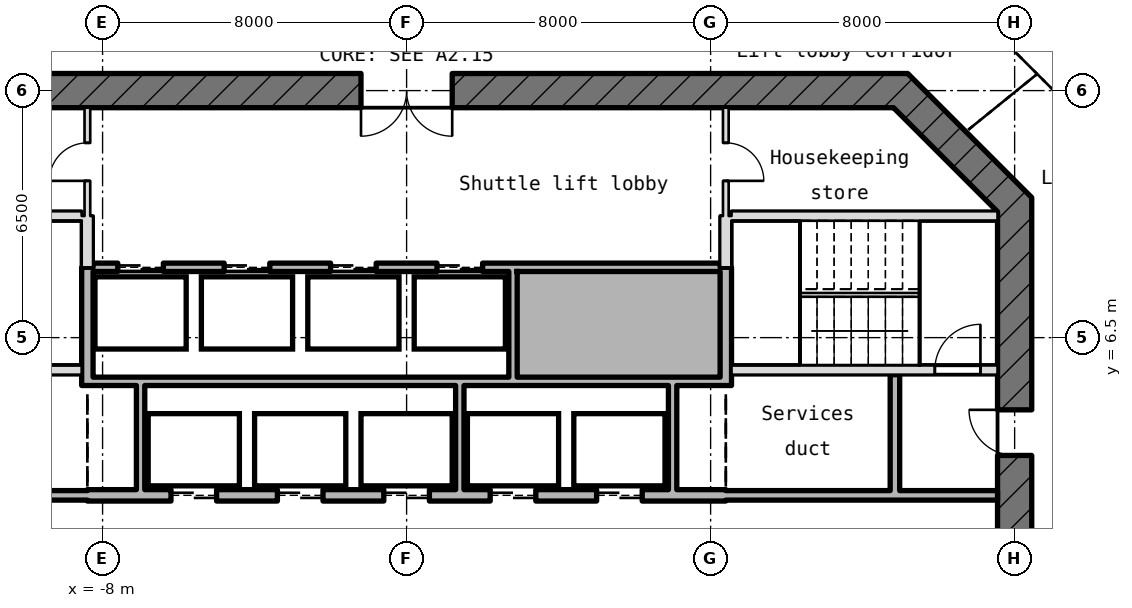
"""IFC4 building model, lengths in metres.
Left out: names, types, materials, properties, quantities, classifications, styles, units other than length and angle.
Written with IfcOpenShell. Run it as: python <this file> out.ifc"""

import sys

from ifc_helpers import new_model, si_unit, direction, frame, frame_2d, origin, place, context, subcontext, project, spatial, rectangle, extrude, element, fill, save


model = new_model("IFC4")
c1 = context("Model", 3, precision=1e-05, world=origin(), true_north=direction((0.0, 1.0)))
c2 = subcontext(c1, "Body", "Model", "MODEL_VIEW")
j1 = project(units=[si_unit("LENGTHUNIT", "METRE"), si_unit("PLANEANGLEUNIT", "RADIAN")], contexts=[c1])
p1 = place(None, origin())
s1 = spatial("IfcSite", under=j1, at=p1, CompositionType="ELEMENT")
p2 = place(p1, origin())
s2 = spatial("IfcBuilding", under=s1, at=p2, CompositionType="ELEMENT")
p3 = place(p2, frame((0.0, 0.0, 155.65)))
s3 = spatial("IfcBuildingStorey", under=s2, at=p3, CompositionType="ELEMENT", Elevation=155.65)
p4 = place(p3, frame((16.0, -10.186, -0.25), z_axis=(0.0, 0.0, 1.0), x_axis=(0.0, 1.0, 0.0)))
e1 = element("IfcWall", 1, at=p4, inside=s3, PredefinedType="SHEAR", context=c2, shape_type="SweptSolid", body=[
    extrude(rectangle(XDim=20.373, YDim=0.9, at=frame_2d((10.186, 0.0))), origin(), (0.0, 0.0, 1.0), 5.47),
])
p5 = place(p4, frame((8.986, 0.0, 0.25)))
e2 = element("IfcOpeningElement", 2, at=p5, cuts=e1, PredefinedType="OPENING", context=c2, shape_type="SweptSolid", body=[
    extrude(rectangle(XDim=2.4, YDim=2.1, at=frame_2d((1.2, 1.05))), frame((0.0, 0.46, 0.0), z_axis=(0.0, -1.0, 0.0), x_axis=(1.0, 0.0, 0.0)), (0.0, 0.0, 1.0), 0.92),
])
p6 = place(p4, frame((13.586, 0.0, 0.25)))
e3 = element("IfcOpeningElement", 3, at=p6, cuts=e1, PredefinedType="OPENING", context=c2, shape_type="SweptSolid", body=[
    extrude(rectangle(XDim=1.2, YDim=2.1, at=frame_2d((0.6, 1.05))), frame((0.0, 0.46, 0.0), z_axis=(0.0, -1.0, 0.0), x_axis=(1.0, 0.0, 0.0)), (0.0, 0.0, 1.0), 0.92),
])
p7 = place(p3, frame((16.132, 9.868, -0.25), z_axis=(0.0, 0.0, 1.0), x_axis=(-0.707106781187, 0.707106781187, 0.0)))
e4 = element("IfcWall", 4, at=p7, inside=s3, PredefinedType="SHEAR", context=c2, shape_type="SweptSolid", body=[
    extrude(rectangle(XDim=4.615, YDim=0.9, at=frame_2d((2.308, 0.0))), origin(), (0.0, 0.0, 1.0), 5.47),
])
p8 = place(p3, frame((13.186, 13.0, -0.25), z_axis=(0.0, 0.0, 1.0), x_axis=(-1.0, 0.0, 0.0)))
e5 = element("IfcWall", 5, at=p8, inside=s3, PredefinedType="SHEAR", context=c2, shape_type="SweptSolid", body=[
    extrude(rectangle(XDim=26.373, YDim=0.9, at=frame_2d((13.186, 0.0))), origin(), (0.0, 0.0, 1.0), 5.47),
])
p9 = place(p8, frame((11.986, 0.0, 0.25)))
e6 = element("IfcOpeningElement", 6, at=p9, cuts=e5, PredefinedType="OPENING", context=c2, shape_type="SweptSolid", body=[
    extrude(rectangle(XDim=2.4, YDim=2.1, at=frame_2d((1.2, 1.05))), frame((0.0, 0.46, 0.0), z_axis=(0.0, -1.0, 0.0), x_axis=(1.0, 0.0, 0.0)), (0.0, 0.0, 1.0), 0.92),
])
p10 = place(p3, frame((-15.55, 2.35, 0.0), z_axis=(0.0, 0.0, 1.0), x_axis=(1.0, 0.0, 0.0)))
e7 = element("IfcWall", 7, at=p10, inside=s3, PredefinedType="STANDARD", context=c2, shape_type="SweptSolid", body=[
    extrude(rectangle(XDim=7.15, YDim=0.25, at=frame_2d((3.575, 0.0))), origin(), (0.0, 0.0, 1.0), 5.22),
])
p11 = place(p3, frame((-8.4, 2.35, -0.25), z_axis=(0.0, 0.0, 1.0), x_axis=(1.0, 0.0, 0.0)))
e8 = element("IfcWall", 8, at=p11, inside=s3, PredefinedType="SHEAR", context=c2, shape_type="SweptSolid", body=[
    extrude(rectangle(XDim=16.8, YDim=0.3, at=frame_2d((8.4, 0.0))), origin(), (0.0, 0.0, 1.0), 5.47),
])
p12 = place(p11, frame((2.2, 0.0, 0.25)))
e9 = element("IfcOpeningElement", 9, at=p12, cuts=e8, PredefinedType="OPENING", context=c2, shape_type="SweptSolid", body=[
    extrude(rectangle(XDim=1.2, YDim=2.1, at=frame_2d((0.6, 1.05))), frame((0.0, 0.16, 0.0), z_axis=(0.0, -1.0, 0.0), x_axis=(1.0, 0.0, 0.0)), (0.0, 0.0, 1.0), 0.32),
])
p13 = place(p11, frame((5.0, 0.0, 0.25)))
e10 = element("IfcOpeningElement", 10, at=p13, cuts=e8, PredefinedType="OPENING", context=c2, shape_type="SweptSolid", body=[
    extrude(rectangle(XDim=1.2, YDim=2.1, at=frame_2d((0.6, 1.05))), frame((0.0, 0.16, 0.0), z_axis=(0.0, -1.0, 0.0), x_axis=(1.0, 0.0, 0.0)), (0.0, 0.0, 1.0), 0.32),
])
p14 = place(p11, frame((7.8, 0.0, 0.25)))
e11 = element("IfcOpeningElement", 11, at=p14, cuts=e8, PredefinedType="OPENING", context=c2, shape_type="SweptSolid", body=[
    extrude(rectangle(XDim=1.2, YDim=2.1, at=frame_2d((0.6, 1.05))), frame((0.0, 0.16, 0.0), z_axis=(0.0, -1.0, 0.0), x_axis=(1.0, 0.0, 0.0)), (0.0, 0.0, 1.0), 0.32),
])
p15 = place(p11, frame((10.6, 0.0, 0.25)))
e12 = element("IfcOpeningElement", 12, at=p15, cuts=e8, PredefinedType="OPENING", context=c2, shape_type="SweptSolid", body=[
    extrude(rectangle(XDim=1.2, YDim=2.1, at=frame_2d((0.6, 1.05))), frame((0.0, 0.16, 0.0), z_axis=(0.0, -1.0, 0.0), x_axis=(1.0, 0.0, 0.0)), (0.0, 0.0, 1.0), 0.32),
])
p16 = place(p11, frame((13.4, 0.0, 0.25)))
e13 = element("IfcOpeningElement", 13, at=p16, cuts=e8, PredefinedType="OPENING", context=c2, shape_type="SweptSolid", body=[
    extrude(rectangle(XDim=1.2, YDim=2.1, at=frame_2d((0.6, 1.05))), frame((0.0, 0.16, 0.0), z_axis=(0.0, -1.0, 0.0), x_axis=(1.0, 0.0, 0.0)), (0.0, 0.0, 1.0), 0.32),
])
p17 = place(p3, frame((8.4, 2.35, 0.0), z_axis=(0.0, 0.0, 1.0), x_axis=(1.0, 0.0, 0.0)))
e14 = element("IfcWall", 14, at=p17, inside=s3, PredefinedType="STANDARD", context=c2, shape_type="SweptSolid", body=[
    extrude(rectangle(XDim=7.15, YDim=0.25, at=frame_2d((3.575, 0.0))), origin(), (0.0, 0.0, 1.0), 5.22),
])
p18 = place(p3, frame((-8.25, 5.35, 0.0), z_axis=(0.0, 0.0, 1.0), x_axis=(1.0, 0.0, 0.0)))
e15 = element("IfcWall", 15, at=p18, inside=s3, PredefinedType="STANDARD", context=c2, shape_type="SweptSolid", body=[
    extrude(rectangle(XDim=16.5, YDim=0.22, at=frame_2d((8.25, 0.0))), origin(), (0.0, 0.0, 1.0), 5.22),
])
p19 = place(p3, frame((-15.55, 5.65, -0.25), z_axis=(0.0, 0.0, 1.0), x_axis=(1.0, 0.0, 0.0)))
e16 = element("IfcWall", 16, at=p19, inside=s3, PredefinedType="SHEAR", context=c2, shape_type="SweptSolid", body=[
    extrude(rectangle(XDim=7.0, YDim=0.25, at=frame_2d((3.5, 0.0))), origin(), (0.0, 0.0, 1.0), 5.47),
])
p20 = place(p19, frame((0.45, 0.0, 0.25)))
e17 = element("IfcOpeningElement", 17, at=p20, cuts=e16, PredefinedType="OPENING", context=c2, shape_type="SweptSolid", body=[
    extrude(rectangle(XDim=1.2, YDim=2.1, at=frame_2d((0.6, 1.05))), frame((0.0, 0.135, 0.0), z_axis=(0.0, -1.0, 0.0), x_axis=(1.0, 0.0, 0.0)), (0.0, 0.0, 1.0), 0.27),
])
p21 = place(p3, frame((8.55, 5.65, -0.25), z_axis=(0.0, 0.0, 1.0), x_axis=(1.0, 0.0, 0.0)))
e18 = element("IfcWall", 18, at=p21, inside=s3, PredefinedType="SHEAR", context=c2, shape_type="SweptSolid", body=[
    extrude(rectangle(XDim=7.0, YDim=0.25, at=frame_2d((3.5, 0.0))), origin(), (0.0, 0.0, 1.0), 5.47),
])
p22 = place(p21, frame((5.35, 0.0, 0.25)))
e19 = element("IfcOpeningElement", 19, at=p22, cuts=e18, PredefinedType="OPENING", context=c2, shape_type="SweptSolid", body=[
    extrude(rectangle(XDim=1.2, YDim=2.1, at=frame_2d((0.6, 1.05))), frame((0.0, 0.135, 0.0), z_axis=(0.0, -1.0, 0.0), x_axis=(1.0, 0.0, 0.0)), (0.0, 0.0, 1.0), 0.27),
])
p23 = place(p3, frame((-8.25, 8.35, 0.0), z_axis=(0.0, 0.0, 1.0), x_axis=(1.0, 0.0, 0.0)))
e20 = element("IfcWall", 20, at=p23, inside=s3, PredefinedType="STANDARD", context=c2, shape_type="SweptSolid", body=[
    extrude(rectangle(XDim=16.5, YDim=0.22, at=frame_2d((8.25, 0.0))), origin(), (0.0, 0.0, 1.0), 5.22),
])
p24 = place(p23, frame((0.65, 0.0, 0.0)))
e21 = element("IfcOpeningElement", 21, at=p24, cuts=e20, PredefinedType="OPENING", context=c2, shape_type="SweptSolid", body=[
    extrude(rectangle(XDim=1.2, YDim=2.1, at=frame_2d((0.6, 1.05))), frame((0.0, 0.12, 0.0), z_axis=(0.0, -1.0, 0.0), x_axis=(1.0, 0.0, 0.0)), (0.0, 0.0, 1.0), 0.24),
])
p25 = place(p23, frame((3.45, 0.0, 0.0)))
e22 = element("IfcOpeningElement", 22, at=p25, cuts=e20, PredefinedType="OPENING", context=c2, shape_type="SweptSolid", body=[
    extrude(rectangle(XDim=1.2, YDim=2.1, at=frame_2d((0.6, 1.05))), frame((0.0, 0.12, 0.0), z_axis=(0.0, -1.0, 0.0), x_axis=(1.0, 0.0, 0.0)), (0.0, 0.0, 1.0), 0.24),
])
p26 = place(p23, frame((6.25, 0.0, 0.0)))
e23 = element("IfcOpeningElement", 23, at=p26, cuts=e20, PredefinedType="OPENING", context=c2, shape_type="SweptSolid", body=[
    extrude(rectangle(XDim=1.2, YDim=2.1, at=frame_2d((0.6, 1.05))), frame((0.0, 0.12, 0.0), z_axis=(0.0, -1.0, 0.0), x_axis=(1.0, 0.0, 0.0)), (0.0, 0.0, 1.0), 0.24),
])
p27 = place(p23, frame((9.05, 0.0, 0.0)))
e24 = element("IfcOpeningElement", 24, at=p27, cuts=e20, PredefinedType="OPENING", context=c2, shape_type="SweptSolid", body=[
    extrude(rectangle(XDim=1.2, YDim=2.1, at=frame_2d((0.6, 1.05))), frame((0.0, 0.12, 0.0), z_axis=(0.0, -1.0, 0.0), x_axis=(1.0, 0.0, 0.0)), (0.0, 0.0, 1.0), 0.24),
])
for number, where, z_axis, x_axis in (
    (25, (-15.55, 9.7, -0.25), (0.0, 0.0, 1.0), (1.0, 0.0, 0.0)),
    (26, (8.55, 9.7, -0.25), (0.0, 0.0, 1.0), (1.0, 0.0, 0.0)),
):
    element("IfcWall", number, at=place(p3, frame(where, z_axis=z_axis, x_axis=x_axis)), inside=s3, PredefinedType="SHEAR", context=c2, shape_type="SweptSolid", body=[
        extrude(rectangle(XDim=7.0, YDim=0.25, at=frame_2d((3.5, 0.0))), origin(), (0.0, 0.0, 1.0), 5.47),
    ])
p28 = place(p3, frame((-8.4, 5.24, -0.25), z_axis=(0.0, 0.0, 1.0), x_axis=(0.0, 1.0, 0.0)))
e27 = element("IfcWall", 27, at=p28, inside=s3, PredefinedType="SHEAR", context=c2, shape_type="SweptSolid", body=[
    extrude(rectangle(XDim=3.11, YDim=0.3, at=frame_2d((1.555, 0.0))), origin(), (0.0, 0.0, 1.0), 5.47),
])
p29 = place(p3, frame((-8.4, 8.35, -0.25), z_axis=(0.0, 0.0, 1.0), x_axis=(0.0, 1.0, 0.0)))
e28 = element("IfcWall", 28, at=p29, inside=s3, PredefinedType="SHEAR", context=c2, shape_type="SweptSolid", body=[
    extrude(rectangle(XDim=1.35, YDim=0.3, at=frame_2d((0.675, 0.0))), origin(), (0.0, 0.0, 1.0), 5.47),
])
p30 = place(p3, frame((-8.4, 9.7, 0.0), z_axis=(0.0, 0.0, 1.0), x_axis=(0.0, 1.0, 0.0)))
e29 = element("IfcWall", 29, at=p30, inside=s3, PredefinedType="PARTITIONING", context=c2, shape_type="SweptSolid", body=[
    extrude(rectangle(XDim=2.85, YDim=0.15, at=frame_2d((1.425, 0.0))), origin(), (0.0, 0.0, 1.0), 5.22),
])
p31 = place(p30, frame((0.925, 0.0, 0.0)))
e30 = element("IfcOpeningElement", 30, at=p31, cuts=e29, PredefinedType="OPENING", context=c2, shape_type="SweptSolid", body=[
    extrude(rectangle(XDim=1.0, YDim=2.1, at=frame_2d((0.5, 1.05))), frame((0.0, 0.085, 0.0), z_axis=(0.0, -1.0, 0.0), x_axis=(1.0, 0.0, 0.0)), (0.0, 0.0, 1.0), 0.17),
])
for number, where, z_axis, x_axis in (
    (31, (-7.0, 2.5, 0.0), (0.0, 0.0, 1.0), (0.0, 1.0, 0.0)),
    (32, (1.4, 2.5, 0.0), (0.0, 0.0, 1.0), (0.0, 1.0, 0.0)),
):
    element("IfcWall", number, at=place(p3, frame(where, z_axis=z_axis, x_axis=x_axis)), inside=s3, PredefinedType="STANDARD", context=c2, shape_type="SweptSolid", body=[
        extrude(rectangle(XDim=2.74, YDim=0.22, at=frame_2d((1.37, 0.0))), origin(), (0.0, 0.0, 1.0), 5.22),
    ])
p32 = place(p3, frame((2.8, 5.46, 0.0), z_axis=(0.0, 0.0, 1.0), x_axis=(0.0, 1.0, 0.0)))
e33 = element("IfcWall", 33, at=p32, inside=s3, PredefinedType="STANDARD", context=c2, shape_type="SweptSolid", body=[
    extrude(rectangle(XDim=2.78, YDim=0.22, at=frame_2d((1.39, 0.0))), origin(), (0.0, 0.0, 1.0), 5.22),
])
p33 = place(p3, frame((7.0, 2.5, 0.0), z_axis=(0.0, 0.0, 1.0), x_axis=(0.0, 1.0, 0.0)))
e34 = element("IfcWall", 34, at=p33, inside=s3, PredefinedType="STANDARD", context=c2, shape_type="SweptSolid", body=[
    extrude(rectangle(XDim=2.74, YDim=0.22, at=frame_2d((1.37, 0.0))), origin(), (0.0, 0.0, 1.0), 5.22),
])
p34 = place(p3, frame((8.4, 5.24, -0.25), z_axis=(0.0, 0.0, 1.0), x_axis=(0.0, 1.0, 0.0)))
e35 = element("IfcWall", 35, at=p34, inside=s3, PredefinedType="SHEAR", context=c2, shape_type="SweptSolid", body=[
    extrude(rectangle(XDim=3.11, YDim=0.3, at=frame_2d((1.555, 0.0))), origin(), (0.0, 0.0, 1.0), 5.47),
])
p35 = place(p3, frame((8.4, 8.35, -0.25), z_axis=(0.0, 0.0, 1.0), x_axis=(0.0, 1.0, 0.0)))
e36 = element("IfcWall", 36, at=p35, inside=s3, PredefinedType="SHEAR", context=c2, shape_type="SweptSolid", body=[
    extrude(rectangle(XDim=1.35, YDim=0.3, at=frame_2d((0.675, 0.0))), origin(), (0.0, 0.0, 1.0), 5.47),
])
p36 = place(p3, frame((8.4, 9.7, 0.0), z_axis=(0.0, 0.0, 1.0), x_axis=(0.0, 1.0, 0.0)))
e37 = element("IfcWall", 37, at=p36, inside=s3, PredefinedType="PARTITIONING", context=c2, shape_type="SweptSolid", body=[
    extrude(rectangle(XDim=2.85, YDim=0.15, at=frame_2d((1.425, 0.0))), origin(), (0.0, 0.0, 1.0), 5.22),
])
p37 = place(p36, frame((0.925, 0.0, 0.0)))
e38 = element("IfcOpeningElement", 38, at=p37, cuts=e37, PredefinedType="OPENING", context=c2, shape_type="SweptSolid", body=[
    extrude(rectangle(XDim=1.0, YDim=2.1, at=frame_2d((0.5, 1.05))), frame((0.0, 0.085, 0.0), z_axis=(0.0, -1.0, 0.0), x_axis=(1.0, 0.0, 0.0)), (0.0, 0.0, 1.0), 0.17),
])
p38 = place(p3, frame((12.85, 2.475, 0.0), z_axis=(0.0, 0.0, 1.0), x_axis=(0.0, 1.0, 0.0)))
e39 = element("IfcWall", 39, at=p38, inside=s3, PredefinedType="STANDARD", context=c2, shape_type="SweptSolid", body=[
    extrude(rectangle(XDim=3.05, YDim=0.25, at=frame_2d((1.525, 0.0))), origin(), (0.0, 0.0, 1.0), 5.22),
])
p39 = place(p3, frame((21.95, 12.465, 0.0), z_axis=(0.0, 0.0, 1.0), x_axis=(-0.707106781187, 0.707106781187, 0.0)))
e40 = element("IfcWall", 40, at=p39, inside=s3, PredefinedType="PARTITIONING", context=c2, shape_type="SweptSolid", body=[
    extrude(rectangle(XDim=9.172, YDim=0.15, at=frame_2d((4.586, 0.0))), origin(), (0.0, 0.0, 1.0), 5.22),
])
p40 = place(p39, frame((1.914, 0.0, 0.0)))
e41 = element("IfcOpeningElement", 41, at=p40, cuts=e40, PredefinedType="OPENING", context=c2, shape_type="SweptSolid", body=[
    extrude(rectangle(XDim=1.0, YDim=2.1, at=frame_2d((0.5, 1.05))), frame((0.0, 0.085, 0.0), z_axis=(0.0, -1.0, 0.0), x_axis=(1.0, 0.0, 0.0)), (0.0, 0.0, 1.0), 0.17),
])
p41 = place(p39, frame((6.5, 0.0, 0.0)))
e42 = element("IfcOpeningElement", 42, at=p41, cuts=e40, PredefinedType="OPENING", context=c2, shape_type="SweptSolid", body=[
    extrude(rectangle(XDim=1.0, YDim=2.1, at=frame_2d((0.5, 1.05))), frame((0.0, 0.085, 0.0), z_axis=(0.0, -1.0, 0.0), x_axis=(1.0, 0.0, 0.0)), (0.0, 0.0, 1.0), 0.17),
])
p42 = place(p12, origin())
e43 = element("IfcDoor", 43, at=p42, inside=s3, OperationType="DOUBLE_DOOR_SLIDING", PredefinedType="DOOR", context=c2, shape_type="SweptSolid", body=[
    extrude(rectangle(XDim=1.2, YDim=2.1, at=frame_2d((0.6, 1.05))), frame((0.0, 0.025, 0.0), z_axis=(0.0, -1.0, 0.0), x_axis=(1.0, 0.0, 0.0)), (0.0, 0.0, 1.0), 0.05),
])
fill(e9, e43)
p43 = place(p13, origin())
e44 = element("IfcDoor", 44, at=p43, inside=s3, OperationType="DOUBLE_DOOR_SLIDING", PredefinedType="DOOR", context=c2, shape_type="SweptSolid", body=[
    extrude(rectangle(XDim=1.2, YDim=2.1, at=frame_2d((0.6, 1.05))), frame((0.0, 0.025, 0.0), z_axis=(0.0, -1.0, 0.0), x_axis=(1.0, 0.0, 0.0)), (0.0, 0.0, 1.0), 0.05),
])
fill(e10, e44)
p44 = place(p14, origin())
e45 = element("IfcDoor", 45, at=p44, inside=s3, OperationType="DOUBLE_DOOR_SLIDING", PredefinedType="DOOR", context=c2, shape_type="SweptSolid", body=[
    extrude(rectangle(XDim=1.2, YDim=2.1, at=frame_2d((0.6, 1.05))), frame((0.0, 0.025, 0.0), z_axis=(0.0, -1.0, 0.0), x_axis=(1.0, 0.0, 0.0)), (0.0, 0.0, 1.0), 0.05),
])
fill(e11, e45)
p45 = place(p15, origin())
e46 = element("IfcDoor", 46, at=p45, inside=s3, OperationType="DOUBLE_DOOR_SLIDING", PredefinedType="DOOR", context=c2, shape_type="SweptSolid", body=[
    extrude(rectangle(XDim=1.2, YDim=2.1, at=frame_2d((0.6, 1.05))), frame((0.0, 0.025, 0.0), z_axis=(0.0, -1.0, 0.0), x_axis=(1.0, 0.0, 0.0)), (0.0, 0.0, 1.0), 0.05),
])
fill(e12, e46)
p46 = place(p16, origin())
e47 = element("IfcDoor", 47, at=p46, inside=s3, OperationType="DOUBLE_DOOR_SLIDING", PredefinedType="DOOR", context=c2, shape_type="SweptSolid", body=[
    extrude(rectangle(XDim=1.2, YDim=2.1, at=frame_2d((0.6, 1.05))), frame((0.0, 0.025, 0.0), z_axis=(0.0, -1.0, 0.0), x_axis=(1.0, 0.0, 0.0)), (0.0, 0.0, 1.0), 0.05),
])
fill(e13, e47)
p47 = place(p24, origin())
e48 = element("IfcDoor", 48, at=p47, inside=s3, OperationType="DOUBLE_DOOR_SLIDING", PredefinedType="DOOR", context=c2, shape_type="SweptSolid", body=[
    extrude(rectangle(XDim=1.2, YDim=2.1, at=frame_2d((0.6, 1.05))), frame((0.0, 0.025, 0.0), z_axis=(0.0, -1.0, 0.0), x_axis=(1.0, 0.0, 0.0)), (0.0, 0.0, 1.0), 0.05),
])
fill(e21, e48)
p48 = place(p25, origin())
e49 = element("IfcDoor", 49, at=p48, inside=s3, OperationType="DOUBLE_DOOR_SLIDING", PredefinedType="DOOR", context=c2, shape_type="SweptSolid", body=[
    extrude(rectangle(XDim=1.2, YDim=2.1, at=frame_2d((0.6, 1.05))), frame((0.0, 0.025, 0.0), z_axis=(0.0, -1.0, 0.0), x_axis=(1.0, 0.0, 0.0)), (0.0, 0.0, 1.0), 0.05),
])
fill(e22, e49)
p49 = place(p26, origin())
e50 = element("IfcDoor", 50, at=p49, inside=s3, OperationType="DOUBLE_DOOR_SLIDING", PredefinedType="DOOR", context=c2, shape_type="SweptSolid", body=[
    extrude(rectangle(XDim=1.2, YDim=2.1, at=frame_2d((0.6, 1.05))), frame((0.0, 0.025, 0.0), z_axis=(0.0, -1.0, 0.0), x_axis=(1.0, 0.0, 0.0)), (0.0, 0.0, 1.0), 0.05),
])
fill(e23, e50)
p50 = place(p27, origin())
e51 = element("IfcDoor", 51, at=p50, inside=s3, OperationType="DOUBLE_DOOR_SLIDING", PredefinedType="DOOR", context=c2, shape_type="SweptSolid", body=[
    extrude(rectangle(XDim=1.2, YDim=2.1, at=frame_2d((0.6, 1.05))), frame((0.0, 0.025, 0.0), z_axis=(0.0, -1.0, 0.0), x_axis=(1.0, 0.0, 0.0)), (0.0, 0.0, 1.0), 0.05),
])
fill(e24, e51)
p51 = place(p22, origin())
e52 = element("IfcDoor", 52, at=p51, inside=s3, OperationType="SINGLE_SWING_RIGHT", PredefinedType="DOOR", context=c2, shape_type="SweptSolid", body=[
    extrude(rectangle(XDim=1.2, YDim=2.1, at=frame_2d((0.6, 1.05))), frame((0.0, 0.025, 0.0), z_axis=(0.0, -1.0, 0.0), x_axis=(1.0, 0.0, 0.0)), (0.0, 0.0, 1.0), 0.05),
])
fill(e19, e52)
p52 = place(p6, origin())
e53 = element("IfcDoor", 53, at=p52, inside=s3, OperationType="SINGLE_SWING_RIGHT", PredefinedType="DOOR", context=c2, shape_type="SweptSolid", body=[
    extrude(rectangle(XDim=1.2, YDim=2.1, at=frame_2d((0.6, 1.05))), frame((0.0, 0.025, 0.0), z_axis=(0.0, -1.0, 0.0), x_axis=(1.0, 0.0, 0.0)), (0.0, 0.0, 1.0), 0.05),
])
fill(e3, e53)
p53 = place(p9, origin())
e54 = element("IfcDoor", 54, at=p53, inside=s3, OperationType="DOUBLE_DOOR_SINGLE_SWING", PredefinedType="DOOR", context=c2, shape_type="SweptSolid", body=[
    extrude(rectangle(XDim=2.4, YDim=2.1, at=frame_2d((1.2, 1.05))), frame((0.0, 0.025, 0.0), z_axis=(0.0, -1.0, 0.0), x_axis=(1.0, 0.0, 0.0)), (0.0, 0.0, 1.0), 0.05),
])
fill(e6, e54)
p54 = place(p31, origin())
e55 = element("IfcDoor", 55, at=p54, inside=s3, OperationType="SINGLE_SWING_RIGHT", PredefinedType="DOOR", context=c2, shape_type="SweptSolid", body=[
    extrude(rectangle(XDim=1.0, YDim=2.1, at=frame_2d((0.5, 1.05))), frame((0.0, 0.025, 0.0), z_axis=(0.0, -1.0, 0.0), x_axis=(1.0, 0.0, 0.0)), (0.0, 0.0, 1.0), 0.05),
])
fill(e30, e55)
p55 = place(p37, frame((1.0, 0.0, 0.0), z_axis=(0.0, 0.0, 1.0), x_axis=(-1.0, 0.0, 0.0)))
e56 = element("IfcDoor", 56, at=p55, inside=s3, OperationType="SINGLE_SWING_LEFT", PredefinedType="DOOR", context=c2, shape_type="SweptSolid", body=[
    extrude(rectangle(XDim=1.0, YDim=2.1, at=frame_2d((0.5, 1.05))), frame((0.0, 0.025, 0.0), z_axis=(0.0, -1.0, 0.0), x_axis=(1.0, 0.0, 0.0)), (0.0, 0.0, 1.0), 0.05),
])
fill(e38, e56)
save(model, sys.argv[1])
